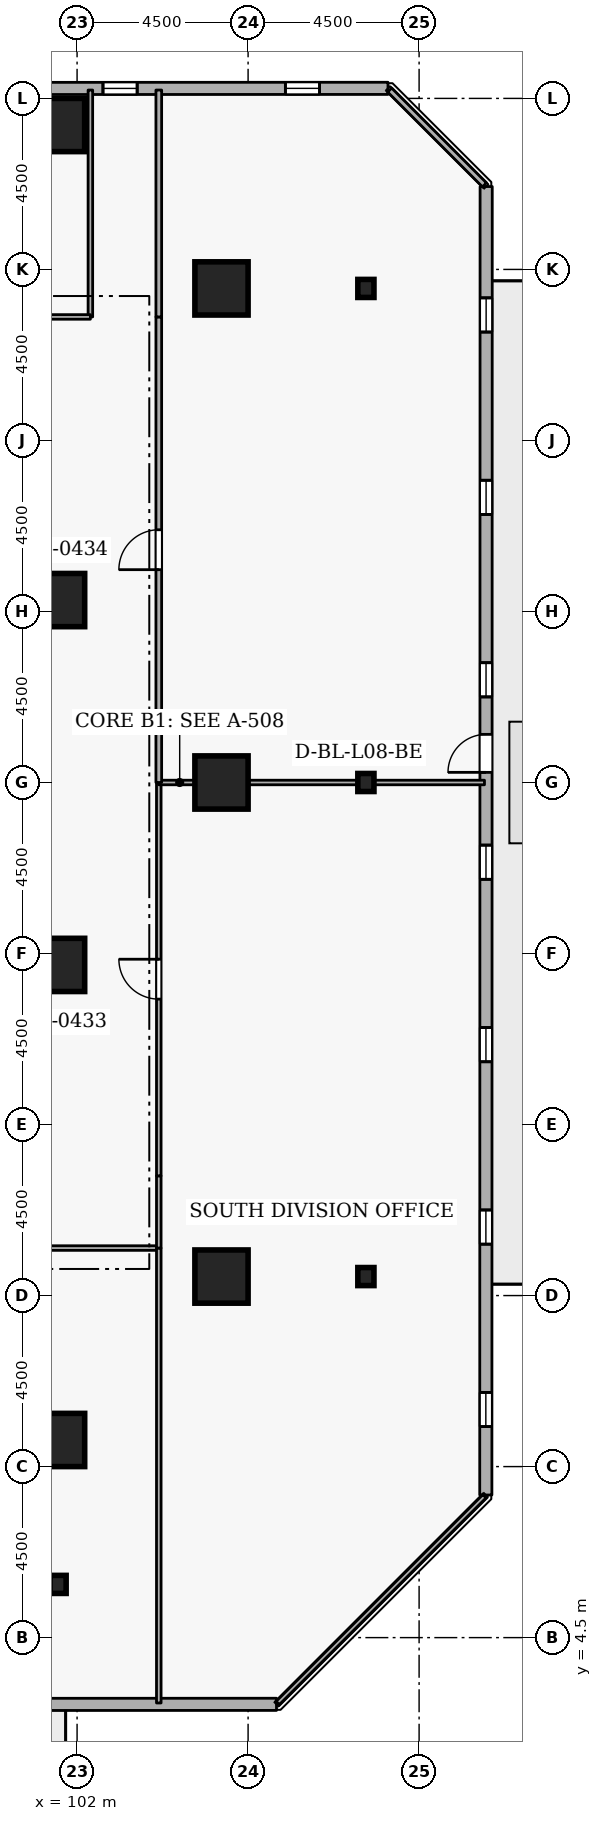
"""IFC4 building model, lengths in metres.
Left out: names, types, materials, properties, quantities, classifications, styles, units other than length and angle.
Written with IfcOpenShell. Run it as: python <this file> out.ifc"""

import sys

from ifc_helpers import new_model, si_unit, direction, frame, frame_2d, origin, origin_2d, place, context, subcontext, project, spatial, rectangle, i_section, extrude, element, fill, save


model = new_model("IFC4")
c1 = context("Model", 3, precision=1e-05, world=origin(), true_north=direction((0.0, 1.0)))
c2 = subcontext(c1, "Body", "Model", "MODEL_VIEW")
j1 = project(units=[si_unit("LENGTHUNIT", "METRE"), si_unit("PLANEANGLEUNIT", "RADIAN")], contexts=[c1])
p1 = place(None, origin())
s1 = spatial("IfcSite", under=j1, at=p1, CompositionType="ELEMENT")
p2 = place(p1, origin())
s2 = spatial("IfcBuilding", under=s1, at=p2, CompositionType="ELEMENT")
p3 = place(p2, frame((0.0, 0.0, 35.1)))
s3 = spatial("IfcBuildingStorey", under=s2, at=p3, CompositionType="ELEMENT", Elevation=35.1)
for number, where, z_axis, x_axis in (
    (1, (105.8, 14.0, 0.0), (0.0, 0.0, 1.0), (1.0, 0.0, 0.0)),
    (2, (105.8, 27.0, 0.0), (0.0, 0.0, 1.0), (1.0, 0.0, 0.0)),
    (3, (105.8, 40.0, 0.0), (0.0, 0.0, 1.0), (1.0, 0.0, 0.0)),
    (4, (101.5, 44.3, 0.0), (0.0, 0.0, 1.0), (1.0, 0.0, 0.0)),
    (5, (101.5, 9.7, 0.0), (0.0, 0.0, 1.0), (1.0, 0.0, 0.0)),
    (6, (101.5, 22.2, 0.0), (0.0, 0.0, 1.0), (1.0, 0.0, 0.0)),
    (7, (101.5, 31.8, 0.0), (0.0, 0.0, 1.0), (1.0, 0.0, 0.0)),
):
    element("IfcColumn", number, at=place(p3, frame(where, z_axis=z_axis, x_axis=x_axis)), inside=s3, PredefinedType="COLUMN", context=c2, shape_type="SweptSolid", body=[
        extrude(rectangle(XDim=1.4, YDim=1.4, at=origin_2d()), origin(), (0.0, 0.0, 1.0), 3.6),
    ])
for number, where, z_axis, x_axis in (
    (8, (109.6, 14.0, 0.0), (0.0, 0.0, 1.0), (1.0, 0.0, 0.0)),
    (9, (109.6, 27.0, 0.0), (0.0, 0.0, 1.0), (1.0, 0.0, 0.0)),
    (10, (109.6, 40.0, 0.0), (0.0, 0.0, 1.0), (1.0, 0.0, 0.0)),
    (11, (101.5, 5.9, 0.0), (0.0, 0.0, 1.0), (1.0, 0.0, 0.0)),
):
    element("IfcColumn", number, at=place(p3, frame(where, z_axis=z_axis, x_axis=x_axis)), inside=s3, PredefinedType="COLUMN", context=c2, shape_type="SweptSolid", body=[
        extrude(i_section(OverallWidth=0.424, OverallDepth=0.475, WebThickness=0.048, FlangeThickness=0.077, FilletRadius=0.015, at=origin_2d()), origin(), (0.0, 0.0, 1.0), 3.6),
    ])
p4 = place(p3, frame((72.819, 2.735, 0.0), z_axis=(0.0, 0.0, 1.0), x_axis=(0.999999961759, 0.000276554545, 0.0)))
e12 = element("IfcWall", 12, at=p4, inside=s3, PredefinedType="STANDARD", context=c2, shape_type="SweptSolid", body=[
    extrude(rectangle(XDim=34.429, YDim=0.32, at=frame_2d((17.214, 0.0))), origin(), (0.0, 0.0, 1.0), 2.7),
])
p5 = place(p4, frame((19.014, 0.0, 0.0)))
e13 = element("IfcOpeningElement", 13, at=p5, cuts=e12, PredefinedType="OPENING", context=c2, shape_type="SweptSolid", body=[
    extrude(rectangle(XDim=1.0, YDim=2.08, at=frame_2d((0.5, 1.04))), frame((0.0, 0.17, 0.0), z_axis=(0.0, -1.0, 0.0), x_axis=(1.0, 0.0, 0.0)), (0.0, 0.0, 1.0), 0.34),
])
p6 = place(p4, frame((1.8, 0.0, 0.72)))
e14 = element("IfcOpeningElement", 14, at=p6, cuts=e12, PredefinedType="OPENING", context=c2, shape_type="SweptSolid", body=[
    extrude(rectangle(XDim=0.9, YDim=1.75, at=frame_2d((0.45, 0.875))), frame((0.0, 0.17, 0.0), z_axis=(0.0, -1.0, 0.0), x_axis=(1.0, 0.0, 0.0)), (0.0, 0.0, 1.0), 0.34),
])
p7 = place(p4, frame((6.6, 0.0, 0.72)))
e15 = element("IfcOpeningElement", 15, at=p7, cuts=e12, PredefinedType="OPENING", context=c2, shape_type="SweptSolid", body=[
    extrude(rectangle(XDim=0.9, YDim=1.75, at=frame_2d((0.45, 0.875))), frame((0.0, 0.17, 0.0), z_axis=(0.0, -1.0, 0.0), x_axis=(1.0, 0.0, 0.0)), (0.0, 0.0, 1.0), 0.34),
])
p8 = place(p4, frame((11.4, 0.0, 0.72)))
e16 = element("IfcOpeningElement", 16, at=p8, cuts=e12, PredefinedType="OPENING", context=c2, shape_type="SweptSolid", body=[
    extrude(rectangle(XDim=0.9, YDim=1.75, at=frame_2d((0.45, 0.875))), frame((0.0, 0.17, 0.0), z_axis=(0.0, -1.0, 0.0), x_axis=(1.0, 0.0, 0.0)), (0.0, 0.0, 1.0), 0.34),
])
p9 = place(p4, frame((16.2, 0.0, 0.72)))
e17 = element("IfcOpeningElement", 17, at=p9, cuts=e12, PredefinedType="OPENING", context=c2, shape_type="SweptSolid", body=[
    extrude(rectangle(XDim=0.9, YDim=1.75, at=frame_2d((0.45, 0.875))), frame((0.0, 0.17, 0.0), z_axis=(0.0, -1.0, 0.0), x_axis=(1.0, 0.0, 0.0)), (0.0, 0.0, 1.0), 0.34),
])
p10 = place(p4, frame((21.0, 0.0, 0.72)))
e18 = element("IfcOpeningElement", 18, at=p10, cuts=e12, PredefinedType="OPENING", context=c2, shape_type="SweptSolid", body=[
    extrude(rectangle(XDim=0.9, YDim=1.75, at=frame_2d((0.45, 0.875))), frame((0.0, 0.17, 0.0), z_axis=(0.0, -1.0, 0.0), x_axis=(1.0, 0.0, 0.0)), (0.0, 0.0, 1.0), 0.34),
])
p11 = place(p4, frame((25.8, 0.0, 0.72)))
e19 = element("IfcOpeningElement", 19, at=p11, cuts=e12, PredefinedType="OPENING", context=c2, shape_type="SweptSolid", body=[
    extrude(rectangle(XDim=0.9, YDim=1.75, at=frame_2d((0.45, 0.875))), frame((0.0, 0.17, 0.0), z_axis=(0.0, -1.0, 0.0), x_axis=(1.0, 0.0, 0.0)), (0.0, 0.0, 1.0), 0.34),
])
p12 = place(p3, frame((112.755, 8.252, 0.0), z_axis=(0.0, 0.0, 1.0), x_axis=(0.000276554545, 0.999999961759, 0.0)))
e20 = element("IfcWall", 20, at=p12, inside=s3, PredefinedType="STANDARD", context=c2, shape_type="SweptSolid", body=[
    extrude(rectangle(XDim=34.429, YDim=0.32, at=frame_2d((17.214, 0.0))), origin(), (0.0, 0.0, 1.0), 2.7),
])
p13 = place(p12, frame((19.014, 0.0, 0.0)))
e21 = element("IfcOpeningElement", 21, at=p13, cuts=e20, PredefinedType="OPENING", context=c2, shape_type="SweptSolid", body=[
    extrude(rectangle(XDim=1.0, YDim=2.08, at=frame_2d((0.5, 1.04))), frame((0.0, 0.17, 0.0), z_axis=(0.0, -1.0, 0.0), x_axis=(1.0, 0.0, 0.0)), (0.0, 0.0, 1.0), 0.34),
])
p14 = place(p12, frame((1.8, 0.0, 0.72)))
e22 = element("IfcOpeningElement", 22, at=p14, cuts=e20, PredefinedType="OPENING", context=c2, shape_type="SweptSolid", body=[
    extrude(rectangle(XDim=0.9, YDim=1.75, at=frame_2d((0.45, 0.875))), frame((0.0, 0.17, 0.0), z_axis=(0.0, -1.0, 0.0), x_axis=(1.0, 0.0, 0.0)), (0.0, 0.0, 1.0), 0.34),
])
p15 = place(p12, frame((6.6, 0.0, 0.72)))
e23 = element("IfcOpeningElement", 23, at=p15, cuts=e20, PredefinedType="OPENING", context=c2, shape_type="SweptSolid", body=[
    extrude(rectangle(XDim=0.9, YDim=1.75, at=frame_2d((0.45, 0.875))), frame((0.0, 0.17, 0.0), z_axis=(0.0, -1.0, 0.0), x_axis=(1.0, 0.0, 0.0)), (0.0, 0.0, 1.0), 0.34),
])
p16 = place(p12, frame((11.4, 0.0, 0.72)))
e24 = element("IfcOpeningElement", 24, at=p16, cuts=e20, PredefinedType="OPENING", context=c2, shape_type="SweptSolid", body=[
    extrude(rectangle(XDim=0.9, YDim=1.75, at=frame_2d((0.45, 0.875))), frame((0.0, 0.17, 0.0), z_axis=(0.0, -1.0, 0.0), x_axis=(1.0, 0.0, 0.0)), (0.0, 0.0, 1.0), 0.34),
])
p17 = place(p12, frame((16.2, 0.0, 0.72)))
e25 = element("IfcOpeningElement", 25, at=p17, cuts=e20, PredefinedType="OPENING", context=c2, shape_type="SweptSolid", body=[
    extrude(rectangle(XDim=0.9, YDim=1.75, at=frame_2d((0.45, 0.875))), frame((0.0, 0.17, 0.0), z_axis=(0.0, -1.0, 0.0), x_axis=(1.0, 0.0, 0.0)), (0.0, 0.0, 1.0), 0.34),
])
p18 = place(p12, frame((21.0, 0.0, 0.72)))
e26 = element("IfcOpeningElement", 26, at=p18, cuts=e20, PredefinedType="OPENING", context=c2, shape_type="SweptSolid", body=[
    extrude(rectangle(XDim=0.9, YDim=1.75, at=frame_2d((0.45, 0.875))), frame((0.0, 0.17, 0.0), z_axis=(0.0, -1.0, 0.0), x_axis=(1.0, 0.0, 0.0)), (0.0, 0.0, 1.0), 0.34),
])
p19 = place(p12, frame((25.8, 0.0, 0.72)))
e27 = element("IfcOpeningElement", 27, at=p19, cuts=e20, PredefinedType="OPENING", context=c2, shape_type="SweptSolid", body=[
    extrude(rectangle(XDim=0.9, YDim=1.75, at=frame_2d((0.45, 0.875))), frame((0.0, 0.17, 0.0), z_axis=(0.0, -1.0, 0.0), x_axis=(1.0, 0.0, 0.0)), (0.0, 0.0, 1.0), 0.34),
])
p20 = place(p12, frame((30.6, 0.0, 0.72)))
e28 = element("IfcOpeningElement", 28, at=p20, cuts=e20, PredefinedType="OPENING", context=c2, shape_type="SweptSolid", body=[
    extrude(rectangle(XDim=0.9, YDim=1.75, at=frame_2d((0.45, 0.875))), frame((0.0, 0.17, 0.0), z_axis=(0.0, -1.0, 0.0), x_axis=(1.0, 0.0, 0.0)), (0.0, 0.0, 1.0), 0.34),
])
p21 = place(p3, frame((110.181, 45.265, 0.0), z_axis=(0.0, 0.0, 1.0), x_axis=(-0.999999961759, -0.000276554545, 0.0)))
e29 = element("IfcWall", 29, at=p21, inside=s3, PredefinedType="STANDARD", context=c2, shape_type="SweptSolid", body=[
    extrude(rectangle(XDim=34.429, YDim=0.32, at=frame_2d((17.214, 0.0))), origin(), (0.0, 0.0, 1.0), 2.7),
])
p22 = place(p21, frame((1.8, 0.0, 0.72)))
e30 = element("IfcOpeningElement", 30, at=p22, cuts=e29, PredefinedType="OPENING", context=c2, shape_type="SweptSolid", body=[
    extrude(rectangle(XDim=0.9, YDim=1.75, at=frame_2d((0.45, 0.875))), frame((0.0, 0.17, 0.0), z_axis=(0.0, -1.0, 0.0), x_axis=(1.0, 0.0, 0.0)), (0.0, 0.0, 1.0), 0.34),
])
p23 = place(p21, frame((6.6, 0.0, 0.72)))
e31 = element("IfcOpeningElement", 31, at=p23, cuts=e29, PredefinedType="OPENING", context=c2, shape_type="SweptSolid", body=[
    extrude(rectangle(XDim=0.9, YDim=1.75, at=frame_2d((0.45, 0.875))), frame((0.0, 0.17, 0.0), z_axis=(0.0, -1.0, 0.0), x_axis=(1.0, 0.0, 0.0)), (0.0, 0.0, 1.0), 0.34),
])
p24 = place(p21, frame((11.4, 0.0, 0.72)))
e32 = element("IfcOpeningElement", 32, at=p24, cuts=e29, PredefinedType="OPENING", context=c2, shape_type="SweptSolid", body=[
    extrude(rectangle(XDim=0.9, YDim=1.75, at=frame_2d((0.45, 0.875))), frame((0.0, 0.17, 0.0), z_axis=(0.0, -1.0, 0.0), x_axis=(1.0, 0.0, 0.0)), (0.0, 0.0, 1.0), 0.34),
])
p25 = place(p21, frame((16.2, 0.0, 0.72)))
e33 = element("IfcOpeningElement", 33, at=p25, cuts=e29, PredefinedType="OPENING", context=c2, shape_type="SweptSolid", body=[
    extrude(rectangle(XDim=0.9, YDim=1.75, at=frame_2d((0.45, 0.875))), frame((0.0, 0.17, 0.0), z_axis=(0.0, -1.0, 0.0), x_axis=(1.0, 0.0, 0.0)), (0.0, 0.0, 1.0), 0.34),
])
p26 = place(p21, frame((25.8, 0.0, 0.72)))
e34 = element("IfcOpeningElement", 34, at=p26, cuts=e29, PredefinedType="OPENING", context=c2, shape_type="SweptSolid", body=[
    extrude(rectangle(XDim=0.9, YDim=1.75, at=frame_2d((0.45, 0.875))), frame((0.0, 0.17, 0.0), z_axis=(0.0, -1.0, 0.0), x_axis=(1.0, 0.0, 0.0)), (0.0, 0.0, 1.0), 0.34),
])
p27 = place(p21, frame((30.6, 0.0, 0.72)))
e35 = element("IfcOpeningElement", 35, at=p27, cuts=e29, PredefinedType="OPENING", context=c2, shape_type="SweptSolid", body=[
    extrude(rectangle(XDim=0.9, YDim=1.75, at=frame_2d((0.45, 0.875))), frame((0.0, 0.17, 0.0), z_axis=(0.0, -1.0, 0.0), x_axis=(1.0, 0.0, 0.0)), (0.0, 0.0, 1.0), 0.34),
])
p28 = place(p3, frame((94.8, 14.75, 0.0), z_axis=(0.0, 0.0, 1.0), x_axis=(1.0, 0.0, 0.0)))
e36 = element("IfcWall", 36, at=p28, inside=s3, PredefinedType="PARTITIONING", context=c2, shape_type="SweptSolid", body=[
    extrude(rectangle(XDim=9.35, YDim=0.12, at=frame_2d((4.675, 0.0))), origin(), (0.0, 0.0, 1.0), 3.34),
])
p29 = place(p28, frame((4.15, 0.0, 0.0)))
e37 = element("IfcOpeningElement", 37, at=p29, cuts=e36, PredefinedType="OPENING", context=c2, shape_type="SweptSolid", body=[
    extrude(rectangle(XDim=1.05, YDim=2.1, at=frame_2d((0.525, 1.05))), frame((0.0, 0.07, 0.0), z_axis=(0.0, -1.0, 0.0), x_axis=(1.0, 0.0, 0.0)), (0.0, 0.0, 1.0), 0.14),
])
p30 = place(p3, frame((104.15, 14.75, 0.0), z_axis=(0.0, 0.0, 1.0), x_axis=(0.0, -1.0, 0.0)))
e38 = element("IfcWall", 38, at=p30, inside=s3, PredefinedType="PARTITIONING", context=c2, shape_type="SweptSolid", body=[
    extrude(rectangle(XDim=11.97, YDim=0.12, at=frame_2d((5.985, 0.0))), origin(), (0.0, 0.0, 1.0), 3.34),
])
p31 = place(p3, frame((102.35, 45.22, 0.0), z_axis=(0.0, 0.0, 1.0), x_axis=(0.0, -1.0, 0.0)))
e39 = element("IfcWall", 39, at=p31, inside=s3, PredefinedType="PARTITIONING", context=c2, shape_type="SweptSolid", body=[
    extrude(rectangle(XDim=5.97, YDim=0.12, at=frame_2d((2.985, 0.0))), origin(), (0.0, 0.0, 1.0), 3.34),
])
p32 = place(p3, frame((102.35, 39.25, 0.0), z_axis=(0.0, 0.0, 1.0), x_axis=(-1.0, 0.0, 0.0)))
e40 = element("IfcWall", 40, at=p32, inside=s3, PredefinedType="PARTITIONING", context=c2, shape_type="SweptSolid", body=[
    extrude(rectangle(XDim=1.862, YDim=0.12, at=frame_2d((0.931, 0.0))), origin(), (0.0, 0.0, 1.0), 3.34),
])
p33 = place(p3, frame((104.15, 14.75, 0.0), z_axis=(0.0, 0.0, 1.0), x_axis=(0.0, 1.0, 0.0)))
e41 = element("IfcWall", 41, at=p33, inside=s3, PredefinedType="PARTITIONING", context=c2, shape_type="SweptSolid", body=[
    extrude(rectangle(XDim=1.9, YDim=0.12, at=frame_2d((0.95, 0.0))), origin(), (0.0, 0.0, 1.0), 3.34),
])
p34 = place(p3, frame((104.15, 16.65, 0.0), z_axis=(0.0, 0.0, 1.0), x_axis=(0.0, 1.0, 0.0)))
e42 = element("IfcWall", 42, at=p34, inside=s3, PredefinedType="PARTITIONING", context=c2, shape_type="SweptSolid", body=[
    extrude(rectangle(XDim=10.35, YDim=0.12, at=frame_2d((5.175, 0.0))), origin(), (0.0, 0.0, 1.0), 3.34),
])
p35 = place(p34, frame((4.65, 0.0, 0.0)))
e43 = element("IfcOpeningElement", 43, at=p35, cuts=e42, PredefinedType="OPENING", context=c2, shape_type="SweptSolid", body=[
    extrude(rectangle(XDim=1.05, YDim=2.1, at=frame_2d((0.525, 1.05))), frame((0.0, 0.07, 0.0), z_axis=(0.0, -1.0, 0.0), x_axis=(1.0, 0.0, 0.0)), (0.0, 0.0, 1.0), 0.14),
])
p36 = place(p3, frame((104.15, 27.0, 0.0), z_axis=(0.0, 0.0, 1.0), x_axis=(1.0, 0.0, 0.0)))
e44 = element("IfcWall", 44, at=p36, inside=s3, PredefinedType="PARTITIONING", context=c2, shape_type="SweptSolid", body=[
    extrude(rectangle(XDim=8.57, YDim=0.12, at=frame_2d((4.285, 0.0))), origin(), (0.0, 0.0, 1.0), 2.878),
])
p37 = place(p3, frame((112.72, 8.219, 0.0), z_axis=(0.0, 0.0, 1.0), x_axis=(-0.707106781187, -0.707106781187, 0.0)))
e45 = element("IfcWall", 45, at=p37, inside=s3, PredefinedType="PARTITIONING", context=c2, shape_type="SweptSolid", body=[
    extrude(rectangle(XDim=7.693, YDim=0.12, at=frame_2d((3.846, 0.0))), origin(), (0.0, 0.0, 1.0), 3.34),
])
p38 = place(p3, frame((104.15, 27.0, 0.0), z_axis=(0.0, 0.0, 1.0), x_axis=(0.0, 1.0, 0.0)))
e46 = element("IfcWall", 46, at=p38, inside=s3, PredefinedType="PARTITIONING", context=c2, shape_type="SweptSolid", body=[
    extrude(rectangle(XDim=12.25, YDim=0.15, at=frame_2d((6.125, 0.0))), origin(), (0.0, 0.0, 1.0), 3.34),
])
p39 = place(p38, frame((5.6, 0.0, 0.0)))
e47 = element("IfcOpeningElement", 47, at=p39, cuts=e46, PredefinedType="OPENING", context=c2, shape_type="SweptSolid", body=[
    extrude(rectangle(XDim=1.05, YDim=2.1, at=frame_2d((0.525, 1.05))), frame((0.0, 0.085, 0.0), z_axis=(0.0, -1.0, 0.0), x_axis=(1.0, 0.0, 0.0)), (0.0, 0.0, 1.0), 0.17),
])
p40 = place(p3, frame((104.15, 39.25, 0.0), z_axis=(0.0, 0.0, 1.0), x_axis=(0.0, 1.0, 0.0)))
e48 = element("IfcWall", 48, at=p40, inside=s3, PredefinedType="PARTITIONING", context=c2, shape_type="SweptSolid", body=[
    extrude(rectangle(XDim=5.97, YDim=0.15, at=frame_2d((2.985, 0.0))), origin(), (0.0, 0.0, 1.0), 3.34),
])
p41 = place(p3, frame((110.225, 45.22, 0.0), z_axis=(0.0, 0.0, 1.0), x_axis=(0.707106781187, -0.707106781187, 0.0)))
e49 = element("IfcWall", 49, at=p41, inside=s3, PredefinedType="PARTITIONING", context=c2, shape_type="SweptSolid", body=[
    extrude(rectangle(XDim=3.528, YDim=0.15, at=frame_2d((1.764, 0.0))), origin(), (0.0, 0.0, 1.0), 3.34),
])
p42 = place(p13, origin())
e50 = element("IfcDoor", 50, at=p42, inside=s3, OperationType="SINGLE_SWING_LEFT", PredefinedType="DOOR", context=c2, shape_type="SweptSolid", body=[
    extrude(rectangle(XDim=1.0, YDim=2.08, at=frame_2d((0.5, 1.04))), frame((0.0, 0.025, 0.0), z_axis=(0.0, -1.0, 0.0), x_axis=(1.0, 0.0, 0.0)), (0.0, 0.0, 1.0), 0.05),
])
fill(e21, e50)
p43 = place(p14, origin())
e51 = element("IfcWindow", 51, at=p43, inside=s3, PartitioningType="SINGLE_PANEL", PredefinedType="WINDOW", context=c2, shape_type="SweptSolid", body=[
    extrude(rectangle(XDim=0.9, YDim=1.75, at=frame_2d((0.45, 0.875))), frame((0.0, 0.03, 0.0), z_axis=(0.0, -1.0, 0.0), x_axis=(1.0, 0.0, 0.0)), (0.0, 0.0, 1.0), 0.06),
])
fill(e22, e51)
p44 = place(p15, origin())
e52 = element("IfcWindow", 52, at=p44, inside=s3, PartitioningType="SINGLE_PANEL", PredefinedType="WINDOW", context=c2, shape_type="SweptSolid", body=[
    extrude(rectangle(XDim=0.9, YDim=1.75, at=frame_2d((0.45, 0.875))), frame((0.0, 0.03, 0.0), z_axis=(0.0, -1.0, 0.0), x_axis=(1.0, 0.0, 0.0)), (0.0, 0.0, 1.0), 0.06),
])
fill(e23, e52)
p45 = place(p16, origin())
e53 = element("IfcWindow", 53, at=p45, inside=s3, PartitioningType="SINGLE_PANEL", PredefinedType="WINDOW", context=c2, shape_type="SweptSolid", body=[
    extrude(rectangle(XDim=0.9, YDim=1.75, at=frame_2d((0.45, 0.875))), frame((0.0, 0.03, 0.0), z_axis=(0.0, -1.0, 0.0), x_axis=(1.0, 0.0, 0.0)), (0.0, 0.0, 1.0), 0.06),
])
fill(e24, e53)
p46 = place(p17, origin())
e54 = element("IfcWindow", 54, at=p46, inside=s3, PartitioningType="SINGLE_PANEL", PredefinedType="WINDOW", context=c2, shape_type="SweptSolid", body=[
    extrude(rectangle(XDim=0.9, YDim=1.75, at=frame_2d((0.45, 0.875))), frame((0.0, 0.03, 0.0), z_axis=(0.0, -1.0, 0.0), x_axis=(1.0, 0.0, 0.0)), (0.0, 0.0, 1.0), 0.06),
])
fill(e25, e54)
p47 = place(p18, origin())
e55 = element("IfcWindow", 55, at=p47, inside=s3, PartitioningType="SINGLE_PANEL", PredefinedType="WINDOW", context=c2, shape_type="SweptSolid", body=[
    extrude(rectangle(XDim=0.9, YDim=1.75, at=frame_2d((0.45, 0.875))), frame((0.0, 0.03, 0.0), z_axis=(0.0, -1.0, 0.0), x_axis=(1.0, 0.0, 0.0)), (0.0, 0.0, 1.0), 0.06),
])
fill(e26, e55)
p48 = place(p19, origin())
e56 = element("IfcWindow", 56, at=p48, inside=s3, PartitioningType="SINGLE_PANEL", PredefinedType="WINDOW", context=c2, shape_type="SweptSolid", body=[
    extrude(rectangle(XDim=0.9, YDim=1.75, at=frame_2d((0.45, 0.875))), frame((0.0, 0.03, 0.0), z_axis=(0.0, -1.0, 0.0), x_axis=(1.0, 0.0, 0.0)), (0.0, 0.0, 1.0), 0.06),
])
fill(e27, e56)
p49 = place(p20, origin())
e57 = element("IfcWindow", 57, at=p49, inside=s3, PartitioningType="SINGLE_PANEL", PredefinedType="WINDOW", context=c2, shape_type="SweptSolid", body=[
    extrude(rectangle(XDim=0.9, YDim=1.75, at=frame_2d((0.45, 0.875))), frame((0.0, 0.03, 0.0), z_axis=(0.0, -1.0, 0.0), x_axis=(1.0, 0.0, 0.0)), (0.0, 0.0, 1.0), 0.06),
])
fill(e28, e57)
p50 = place(p22, origin())
e58 = element("IfcWindow", 58, at=p50, inside=s3, PartitioningType="SINGLE_PANEL", PredefinedType="WINDOW", context=c2, shape_type="SweptSolid", body=[
    extrude(rectangle(XDim=0.9, YDim=1.75, at=frame_2d((0.45, 0.875))), frame((0.0, 0.03, 0.0), z_axis=(0.0, -1.0, 0.0), x_axis=(1.0, 0.0, 0.0)), (0.0, 0.0, 1.0), 0.06),
])
fill(e30, e58)
p51 = place(p23, origin())
e59 = element("IfcWindow", 59, at=p51, inside=s3, PartitioningType="SINGLE_PANEL", PredefinedType="WINDOW", context=c2, shape_type="SweptSolid", body=[
    extrude(rectangle(XDim=0.9, YDim=1.75, at=frame_2d((0.45, 0.875))), frame((0.0, 0.03, 0.0), z_axis=(0.0, -1.0, 0.0), x_axis=(1.0, 0.0, 0.0)), (0.0, 0.0, 1.0), 0.06),
])
fill(e31, e59)
p52 = place(p35, origin())
e60 = element("IfcDoor", 60, at=p52, inside=s3, OperationType="SINGLE_SWING_RIGHT", PredefinedType="DOOR", context=c2, shape_type="SweptSolid", body=[
    extrude(rectangle(XDim=1.05, YDim=2.1, at=frame_2d((0.525, 1.05))), frame((0.0, 0.025, 0.0), z_axis=(0.0, -1.0, 0.0), x_axis=(1.0, 0.0, 0.0)), (0.0, 0.0, 1.0), 0.05),
])
fill(e43, e60)
p53 = place(p39, origin())
e61 = element("IfcDoor", 61, at=p53, inside=s3, OperationType="SINGLE_SWING_LEFT", PredefinedType="DOOR", context=c2, shape_type="SweptSolid", body=[
    extrude(rectangle(XDim=1.05, YDim=2.1, at=frame_2d((0.525, 1.05))), frame((0.0, 0.025, 0.0), z_axis=(0.0, -1.0, 0.0), x_axis=(1.0, 0.0, 0.0)), (0.0, 0.0, 1.0), 0.05),
])
fill(e47, e61)
save(model, sys.argv[1])
